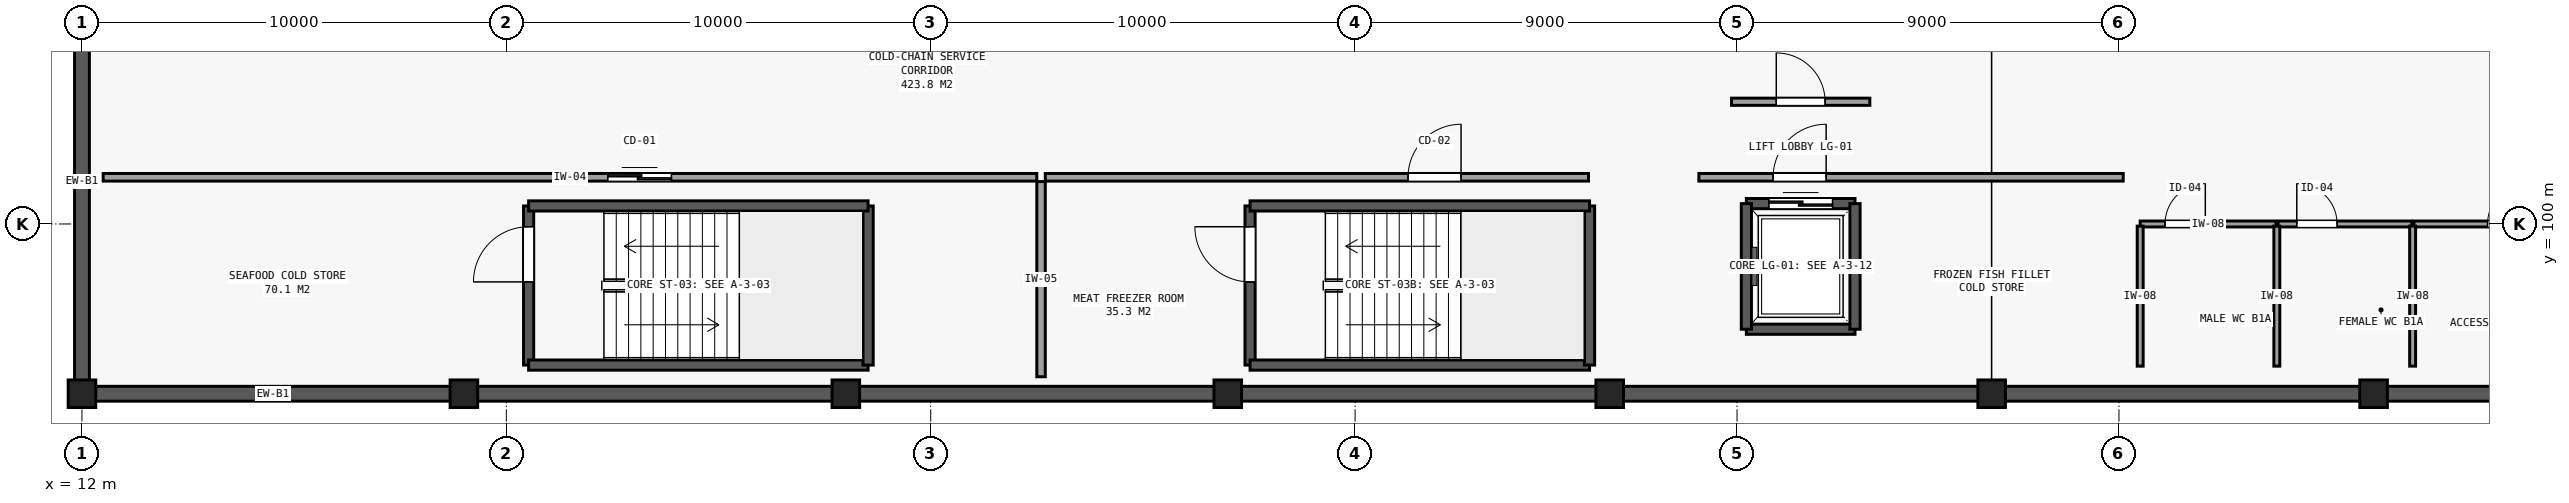
"""IFC4 building model, lengths in metres.
Left out: names, types, materials, properties, quantities, classifications, styles, units other than length and angle.
Written with IfcOpenShell. Run it as: python <this file> out.ifc"""

import sys

from ifc_helpers import new_model, si_unit, direction, frame, frame_2d, origin, origin_2d, place, context, subcontext, project, spatial, rectangle, extrude, element, fill, save


model = new_model("IFC4")
c1 = context("Model", 3, precision=1e-05, world=origin(), true_north=direction((0.0, 1.0)))
c2 = subcontext(c1, "Body", "Model", "MODEL_VIEW")
j1 = project(units=[si_unit("LENGTHUNIT", "METRE"), si_unit("PLANEANGLEUNIT", "RADIAN")], contexts=[c1])
p1 = place(None, origin())
s1 = spatial("IfcSite", under=j1, at=p1, CompositionType="ELEMENT")
p2 = place(p1, origin())
s2 = spatial("IfcBuilding", under=s1, at=p2, CompositionType="ELEMENT")
p3 = place(p2, frame((0.0, 0.0, -4.2)))
s3 = spatial("IfcBuildingStorey", under=s2, at=p3, CompositionType="ELEMENT", Elevation=-4.2)
for number, where, z_axis, x_axis in (
    (1, (12.0, 96.0, -0.4), (0.0, 0.0, 1.0), (1.0, 0.0, 0.0)),
    (2, (21.0, 96.0, -0.4), (0.0, 0.0, 1.0), (1.0, 0.0, 0.0)),
    (3, (30.0, 96.0, -0.4), (0.0, 0.0, 1.0), (1.0, 0.0, 0.0)),
    (4, (39.0, 96.0, -0.4), (0.0, 0.0, 1.0), (1.0, 0.0, 0.0)),
    (5, (48.0, 96.0, -0.4), (0.0, 0.0, 1.0), (1.0, 0.0, 0.0)),
    (6, (57.0, 96.0, -0.4), (0.0, 0.0, 1.0), (1.0, 0.0, 0.0)),
    (7, (66.0, 96.0, -0.4), (0.0, 0.0, 1.0), (1.0, 0.0, 0.0)),
):
    element("IfcColumn", number, at=place(p3, frame(where, z_axis=z_axis, x_axis=x_axis)), inside=s3, PredefinedType="COLUMN", context=c2, shape_type="SweptSolid", body=[
        extrude(rectangle(XDim=0.65, YDim=0.65, at=origin_2d()), origin(), (0.0, 0.0, 1.0), 4.6),
    ])
for number, where, z_axis, x_axis in (
    (8, (21.0, 96.0, 0.0), (0.0, 0.0, 1.0), (-1.0, 0.0, 0.0)),
    (9, (30.0, 96.0, 0.0), (0.0, 0.0, 1.0), (-1.0, 0.0, 0.0)),
    (10, (39.0, 96.0, 0.0), (0.0, 0.0, 1.0), (-1.0, 0.0, 0.0)),
    (11, (48.0, 96.0, 0.0), (0.0, 0.0, 1.0), (-1.0, 0.0, 0.0)),
    (12, (57.0, 96.0, 0.0), (0.0, 0.0, 1.0), (-1.0, 0.0, 0.0)),
    (13, (66.0, 96.0, 0.0), (0.0, 0.0, 1.0), (-1.0, 0.0, 0.0)),
    (14, (75.0, 96.0, 0.0), (0.0, 0.0, 1.0), (-1.0, 0.0, 0.0)),
):
    element("IfcWall", number, at=place(p3, frame(where, z_axis=z_axis, x_axis=x_axis)), inside=s3, PredefinedType="SOLIDWALL", context=c2, shape_type="SweptSolid", body=[
        extrude(rectangle(XDim=9.0, YDim=0.35, at=frame_2d((4.5, 0.0))), origin(), (0.0, 0.0, 1.0), 3.84),
    ])
p4 = place(p3, frame((12.0, 96.0, 0.0), z_axis=(0.0, 0.0, 1.0), x_axis=(0.0, 1.0, 0.0)))
e15 = element("IfcWall", 15, at=p4, inside=s3, PredefinedType="SOLIDWALL", context=c2, shape_type="SweptSolid", body=[
    extrude(rectangle(XDim=10.0, YDim=0.35, at=frame_2d((5.0, 0.0))), origin(), (0.0, 0.0, 1.0), 3.84),
])
p5 = place(p3, frame((22.525, 96.675, 0.0), z_axis=(0.0, 0.0, 1.0), x_axis=(0.0, 1.0, 0.0)))
e16 = element("IfcWall", 16, at=p5, inside=s3, PredefinedType="SOLIDWALL", context=c2, shape_type="SweptSolid", body=[
    extrude(rectangle(XDim=3.75, YDim=0.24, at=frame_2d((1.875, 0.0))), origin(), (0.0, 0.0, 1.0), 3.84),
])
p6 = place(p5, frame((1.96, 0.0, 0.0)))
e17 = element("IfcOpeningElement", 17, at=p6, cuts=e16, PredefinedType="OPENING", context=c2, shape_type="SweptSolid", body=[
    extrude(rectangle(XDim=1.3, YDim=2.15, at=frame_2d((0.65, 1.075))), frame((0.0, 0.13, 0.0), z_axis=(0.0, -1.0, 0.0), x_axis=(1.0, 0.0, 0.0)), (0.0, 0.0, 1.0), 0.26),
])
p7 = place(p3, frame((30.525, 96.675, 0.0), z_axis=(0.0, 0.0, 1.0), x_axis=(-1.0, 0.0, 0.0)))
e18 = element("IfcWall", 18, at=p7, inside=s3, PredefinedType="SOLIDWALL", context=c2, shape_type="SweptSolid", body=[
    extrude(rectangle(XDim=8.0, YDim=0.24, at=frame_2d((4.0, 0.0))), origin(), (0.0, 0.0, 1.0), 3.84),
])
p8 = place(p3, frame((30.525, 100.425, 0.0), z_axis=(0.0, 0.0, 1.0), x_axis=(0.0, -1.0, 0.0)))
e19 = element("IfcWall", 19, at=p8, inside=s3, PredefinedType="SOLIDWALL", context=c2, shape_type="SweptSolid", body=[
    extrude(rectangle(XDim=3.75, YDim=0.24, at=frame_2d((1.875, 0.0))), origin(), (0.0, 0.0, 1.0), 3.84),
])
p9 = place(p3, frame((22.525, 100.425, 0.0), z_axis=(0.0, 0.0, 1.0), x_axis=(1.0, 0.0, 0.0)))
e20 = element("IfcWall", 20, at=p9, inside=s3, PredefinedType="SOLIDWALL", context=c2, shape_type="SweptSolid", body=[
    extrude(rectangle(XDim=8.0, YDim=0.24, at=frame_2d((4.0, 0.0))), origin(), (0.0, 0.0, 1.0), 3.84),
])
p10 = place(p3, frame((39.525, 96.675, 0.0), z_axis=(0.0, 0.0, 1.0), x_axis=(0.0, 1.0, 0.0)))
e21 = element("IfcWall", 21, at=p10, inside=s3, PredefinedType="SOLIDWALL", context=c2, shape_type="SweptSolid", body=[
    extrude(rectangle(XDim=3.75, YDim=0.24, at=frame_2d((1.875, 0.0))), origin(), (0.0, 0.0, 1.0), 3.84),
])
p11 = place(p10, frame((1.96, 0.0, 0.0)))
e22 = element("IfcOpeningElement", 22, at=p11, cuts=e21, PredefinedType="OPENING", context=c2, shape_type="SweptSolid", body=[
    extrude(rectangle(XDim=1.3, YDim=2.15, at=frame_2d((0.65, 1.075))), frame((0.0, 0.13, 0.0), z_axis=(0.0, -1.0, 0.0), x_axis=(1.0, 0.0, 0.0)), (0.0, 0.0, 1.0), 0.26),
])
p12 = place(p3, frame((47.525, 96.675, 0.0), z_axis=(0.0, 0.0, 1.0), x_axis=(-1.0, 0.0, 0.0)))
e23 = element("IfcWall", 23, at=p12, inside=s3, PredefinedType="SOLIDWALL", context=c2, shape_type="SweptSolid", body=[
    extrude(rectangle(XDim=8.0, YDim=0.24, at=frame_2d((4.0, 0.0))), origin(), (0.0, 0.0, 1.0), 3.84),
])
p13 = place(p3, frame((47.525, 100.425, 0.0), z_axis=(0.0, 0.0, 1.0), x_axis=(0.0, -1.0, 0.0)))
e24 = element("IfcWall", 24, at=p13, inside=s3, PredefinedType="SOLIDWALL", context=c2, shape_type="SweptSolid", body=[
    extrude(rectangle(XDim=3.75, YDim=0.24, at=frame_2d((1.875, 0.0))), origin(), (0.0, 0.0, 1.0), 3.84),
])
p14 = place(p3, frame((39.525, 100.425, 0.0), z_axis=(0.0, 0.0, 1.0), x_axis=(1.0, 0.0, 0.0)))
e25 = element("IfcWall", 25, at=p14, inside=s3, PredefinedType="SOLIDWALL", context=c2, shape_type="SweptSolid", body=[
    extrude(rectangle(XDim=8.0, YDim=0.24, at=frame_2d((4.0, 0.0))), origin(), (0.0, 0.0, 1.0), 3.84),
])
p15 = place(p3, frame((53.78, 97.52, 0.0), z_axis=(0.0, 0.0, 1.0), x_axis=(-1.0, 0.0, 0.0)))
e26 = element("IfcWall", 26, at=p15, inside=s3, PredefinedType="SOLIDWALL", context=c2, shape_type="SweptSolid", body=[
    extrude(rectangle(XDim=2.56, YDim=0.24, at=frame_2d((1.28, 0.0))), origin(), (0.0, 0.0, 1.0), 3.8),
])
p16 = place(p3, frame((51.22, 100.48, 0.0), z_axis=(0.0, 0.0, 1.0), x_axis=(1.0, 0.0, 0.0)))
e27 = element("IfcWall", 27, at=p16, inside=s3, PredefinedType="SOLIDWALL", context=c2, shape_type="SweptSolid", body=[
    extrude(rectangle(XDim=2.56, YDim=0.24, at=frame_2d((1.28, 0.0))), origin(), (0.0, 0.0, 1.0), 3.8),
])
p17 = place(p16, frame((0.53, 0.0, 0.0)))
e28 = element("IfcOpeningElement", 28, at=p17, cuts=e27, PredefinedType="OPENING", context=c2, shape_type="SweptSolid", body=[
    extrude(rectangle(XDim=1.5, YDim=2.25, at=frame_2d((0.75, 1.125))), frame((0.0, 0.13, 0.0), z_axis=(0.0, -1.0, 0.0), x_axis=(1.0, 0.0, 0.0)), (0.0, 0.0, 1.0), 0.26),
])
for number, where, z_axis, x_axis in (
    (29, (51.22, 97.52, 0.0), (0.0, 0.0, 1.0), (0.0, 1.0, 0.0)),
    (30, (53.78, 100.48, 0.0), (0.0, 0.0, 1.0), (0.0, -1.0, 0.0)),
):
    element("IfcWall", number, at=place(p3, frame(where, z_axis=z_axis, x_axis=x_axis)), inside=s3, PredefinedType="SOLIDWALL", context=c2, shape_type="SweptSolid", body=[
        extrude(rectangle(XDim=2.96, YDim=0.24, at=frame_2d((1.48, 0.0))), origin(), (0.0, 0.0, 1.0), 3.8),
    ])
p18 = place(p3, frame((50.87, 102.88, 0.0), z_axis=(0.0, 0.0, 1.0), x_axis=(1.0, 0.0, 0.0)))
e31 = element("IfcWall", 31, at=p18, inside=s3, PredefinedType="PARTITIONING", context=c2, shape_type="SweptSolid", body=[
    extrude(rectangle(XDim=3.26, YDim=0.17, at=frame_2d((1.63, 0.0))), origin(), (0.0, 0.0, 1.0), 3.8),
])
p19 = place(p18, frame((1.055, 0.0, 0.0)))
e32 = element("IfcOpeningElement", 32, at=p19, cuts=e31, PredefinedType="OPENING", context=c2, shape_type="SweptSolid", body=[
    extrude(rectangle(XDim=1.15, YDim=2.15, at=frame_2d((0.575, 1.075))), frame((0.0, 0.095, 0.0), z_axis=(0.0, -1.0, 0.0), x_axis=(1.0, 0.0, 0.0)), (0.0, 0.0, 1.0), 0.19),
])
p20 = place(p3, frame((60.5, 100.0, 0.0), z_axis=(0.0, 0.0, 1.0), x_axis=(1.0, 0.0, 0.0)))
e33 = element("IfcWall", 33, at=p20, inside=s3, PredefinedType="PARTITIONING", context=c2, shape_type="SweptSolid", body=[
    extrude(rectangle(XDim=3.2, YDim=0.14, at=frame_2d((1.6, 0.0))), origin(), (0.0, 0.0, 1.0), 3.8),
])
p21 = place(p20, frame((0.585, 0.0, 0.0)))
e34 = element("IfcOpeningElement", 34, at=p21, cuts=e33, PredefinedType="OPENING", context=c2, shape_type="SweptSolid", body=[
    extrude(rectangle(XDim=0.95, YDim=2.1, at=frame_2d((0.475, 1.05))), frame((0.0, 0.08, 0.0), z_axis=(0.0, -1.0, 0.0), x_axis=(1.0, 0.0, 0.0)), (0.0, 0.0, 1.0), 0.16),
])
p22 = place(p3, frame((63.75, 100.0, 0.0), z_axis=(0.0, 0.0, 1.0), x_axis=(1.0, 0.0, 0.0)))
e35 = element("IfcWall", 35, at=p22, inside=s3, PredefinedType="PARTITIONING", context=c2, shape_type="SweptSolid", body=[
    extrude(rectangle(XDim=3.15, YDim=0.14, at=frame_2d((1.575, 0.0))), origin(), (0.0, 0.0, 1.0), 2.99),
])
p23 = place(p22, frame((0.44, 0.0, 0.0)))
e36 = element("IfcOpeningElement", 36, at=p23, cuts=e35, PredefinedType="OPENING", context=c2, shape_type="SweptSolid", body=[
    extrude(rectangle(XDim=0.95, YDim=2.1, at=frame_2d((0.475, 1.05))), frame((0.0, 0.08, 0.0), z_axis=(0.0, -1.0, 0.0), x_axis=(1.0, 0.0, 0.0)), (0.0, 0.0, 1.0), 0.16),
])
p24 = place(p3, frame((66.95, 100.0, 0.0), z_axis=(0.0, 0.0, 1.0), x_axis=(1.0, 0.0, 0.0)))
e37 = element("IfcWall", 37, at=p24, inside=s3, PredefinedType="PARTITIONING", context=c2, shape_type="SweptSolid", body=[
    extrude(rectangle(XDim=3.15, YDim=0.14, at=frame_2d((1.575, 0.0))), origin(), (0.0, 0.0, 1.0), 3.8),
])
p25 = place(p24, frame((1.736, 0.0, 0.0)))
e38 = element("IfcOpeningElement", 38, at=p25, cuts=e37, PredefinedType="OPENING", context=c2, shape_type="SweptSolid", body=[
    extrude(rectangle(XDim=0.98, YDim=2.15, at=frame_2d((0.49, 1.075))), frame((0.0, 0.08, 0.0), z_axis=(0.0, -1.0, 0.0), x_axis=(1.0, 0.0, 0.0)), (0.0, 0.0, 1.0), 0.16),
])
for number, where, z_axis, x_axis in (
    (39, (63.72, 96.65, 0.0), (0.0, 0.0, 1.0), (0.0, 1.0, 0.0)),
    (40, (66.92, 96.65, 0.0), (0.0, 0.0, 1.0), (0.0, 1.0, 0.0)),
    (41, (60.5, 96.65, 0.0), (0.0, 0.0, 1.0), (0.0, 1.0, 0.0)),
):
    element("IfcWall", number, at=place(p3, frame(where, z_axis=z_axis, x_axis=x_axis)), inside=s3, PredefinedType="PARTITIONING", context=c2, shape_type="SweptSolid", body=[
        extrude(rectangle(XDim=3.3, YDim=0.14, at=frame_2d((1.65, 0.0))), origin(), (0.0, 0.0, 1.0), 3.8),
    ])
p26 = place(p3, frame((12.5, 101.1, 0.0), z_axis=(0.0, 0.0, 1.0), x_axis=(1.0, 0.0, 0.0)))
e42 = element("IfcWall", 42, at=p26, inside=s3, PredefinedType="PARTITIONING", context=c2, shape_type="SweptSolid", body=[
    extrude(rectangle(XDim=22.0, YDim=0.18, at=frame_2d((11.0, 0.0))), origin(), (0.0, 0.0, 1.0), 2.74),
])
p27 = place(p26, frame((11.89, 0.0, 0.0)))
e43 = element("IfcOpeningElement", 43, at=p27, cuts=e42, PredefinedType="OPENING", context=c2, shape_type="SweptSolid", body=[
    extrude(rectangle(XDim=1.5, YDim=2.25, at=frame_2d((0.75, 1.125))), frame((0.0, 0.1, 0.0), z_axis=(0.0, -1.0, 0.0), x_axis=(1.0, 0.0, 0.0)), (0.0, 0.0, 1.0), 0.2),
])
p28 = place(p3, frame((34.7, 101.1, 0.0), z_axis=(0.0, 0.0, 1.0), x_axis=(1.0, 0.0, 0.0)))
e44 = element("IfcWall", 44, at=p28, inside=s3, PredefinedType="PARTITIONING", context=c2, shape_type="SweptSolid", body=[
    extrude(rectangle(XDim=12.8, YDim=0.18, at=frame_2d((6.4, 0.0))), origin(), (0.0, 0.0, 1.0), 2.74),
])
p29 = place(p28, frame((8.547, 0.0, 0.0)))
e45 = element("IfcOpeningElement", 45, at=p29, cuts=e44, PredefinedType="OPENING", context=c2, shape_type="SweptSolid", body=[
    extrude(rectangle(XDim=1.25, YDim=2.2, at=frame_2d((0.625, 1.1))), frame((0.0, 0.1, 0.0), z_axis=(0.0, -1.0, 0.0), x_axis=(1.0, 0.0, 0.0)), (0.0, 0.0, 1.0), 0.2),
])
p30 = place(p3, frame((34.6, 96.4, 0.0), z_axis=(0.0, 0.0, 1.0), x_axis=(0.0, 1.0, 0.0)))
e46 = element("IfcWall", 46, at=p30, inside=s3, PredefinedType="PARTITIONING", context=c2, shape_type="SweptSolid", body=[
    extrude(rectangle(XDim=4.6, YDim=0.2, at=frame_2d((2.3, 0.0))), origin(), (0.0, 0.0, 1.0), 3.8),
])
p31 = place(p3, frame((50.1, 101.1, 0.0), z_axis=(0.0, 0.0, 1.0), x_axis=(1.0, 0.0, 0.0)))
e47 = element("IfcWall", 47, at=p31, inside=s3, PredefinedType="PARTITIONING", context=c2, shape_type="SweptSolid", body=[
    extrude(rectangle(XDim=10.0, YDim=0.18, at=frame_2d((5.0, 0.0))), origin(), (0.0, 0.0, 1.0), 2.99),
])
p32 = place(p31, frame((1.75, 0.0, 0.0)))
e48 = element("IfcOpeningElement", 48, at=p32, cuts=e47, PredefinedType="OPENING", context=c2, shape_type="SweptSolid", body=[
    extrude(rectangle(XDim=1.25, YDim=2.2, at=frame_2d((0.625, 1.1))), frame((0.0, 0.1, 0.0), z_axis=(0.0, -1.0, 0.0), x_axis=(1.0, 0.0, 0.0)), (0.0, 0.0, 1.0), 0.2),
])
p33 = place(p6, origin())
e49 = element("IfcDoor", 49, at=p33, inside=s3, OperationType="SINGLE_SWING_LEFT", PredefinedType="DOOR", context=c2, shape_type="SweptSolid", body=[
    extrude(rectangle(XDim=1.3, YDim=2.15, at=frame_2d((0.65, 1.075))), frame((0.0, 0.025, 0.0), z_axis=(0.0, -1.0, 0.0), x_axis=(1.0, 0.0, 0.0)), (0.0, 0.0, 1.0), 0.05),
])
fill(e17, e49)
p34 = place(p11, origin())
e50 = element("IfcDoor", 50, at=p34, inside=s3, OperationType="SINGLE_SWING_RIGHT", PredefinedType="DOOR", context=c2, shape_type="SweptSolid", body=[
    extrude(rectangle(XDim=1.3, YDim=2.15, at=frame_2d((0.65, 1.075))), frame((0.0, 0.025, 0.0), z_axis=(0.0, -1.0, 0.0), x_axis=(1.0, 0.0, 0.0)), (0.0, 0.0, 1.0), 0.05),
])
fill(e22, e50)
p35 = place(p17, origin())
e51 = element("IfcDoor", 51, at=p35, inside=s3, OperationType="DOUBLE_DOOR_SLIDING", PredefinedType="DOOR", context=c2, shape_type="SweptSolid", body=[
    extrude(rectangle(XDim=1.5, YDim=2.25, at=frame_2d((0.75, 1.125))), frame((0.0, 0.025, 0.0), z_axis=(0.0, -1.0, 0.0), x_axis=(1.0, 0.0, 0.0)), (0.0, 0.0, 1.0), 0.05),
])
fill(e28, e51)
p36 = place(p19, origin())
e52 = element("IfcDoor", 52, at=p36, inside=s3, OperationType="SINGLE_SWING_LEFT", PredefinedType="DOOR", context=c2, shape_type="SweptSolid", body=[
    extrude(rectangle(XDim=1.15, YDim=2.15, at=frame_2d((0.575, 1.075))), frame((0.0, 0.025, 0.0), z_axis=(0.0, -1.0, 0.0), x_axis=(1.0, 0.0, 0.0)), (0.0, 0.0, 1.0), 0.05),
])
fill(e32, e52)
p37 = place(p21, origin())
e53 = element("IfcDoor", 53, at=p37, inside=s3, OperationType="SINGLE_SWING_RIGHT", PredefinedType="DOOR", context=c2, shape_type="SweptSolid", body=[
    extrude(rectangle(XDim=0.95, YDim=2.1, at=frame_2d((0.475, 1.05))), frame((0.0, 0.025, 0.0), z_axis=(0.0, -1.0, 0.0), x_axis=(1.0, 0.0, 0.0)), (0.0, 0.0, 1.0), 0.05),
])
fill(e34, e53)
p38 = place(p23, origin())
e54 = element("IfcDoor", 54, at=p38, inside=s3, OperationType="SINGLE_SWING_LEFT", PredefinedType="DOOR", context=c2, shape_type="SweptSolid", body=[
    extrude(rectangle(XDim=0.95, YDim=2.1, at=frame_2d((0.475, 1.05))), frame((0.0, 0.025, 0.0), z_axis=(0.0, -1.0, 0.0), x_axis=(1.0, 0.0, 0.0)), (0.0, 0.0, 1.0), 0.05),
])
fill(e36, e54)
p39 = place(p25, origin())
e55 = element("IfcDoor", 55, at=p39, inside=s3, OperationType="SINGLE_SWING_RIGHT", PredefinedType="DOOR", context=c2, shape_type="SweptSolid", body=[
    extrude(rectangle(XDim=0.98, YDim=2.15, at=frame_2d((0.49, 1.075))), frame((0.0, 0.025, 0.0), z_axis=(0.0, -1.0, 0.0), x_axis=(1.0, 0.0, 0.0)), (0.0, 0.0, 1.0), 0.05),
])
fill(e38, e55)
p40 = place(p27, origin())
e56 = element("IfcDoor", 56, at=p40, inside=s3, OperationType="SLIDING_TO_LEFT", PredefinedType="DOOR", context=c2, shape_type="SweptSolid", body=[
    extrude(rectangle(XDim=1.5, YDim=2.25, at=frame_2d((0.75, 1.125))), frame((0.0, 0.025, 0.0), z_axis=(0.0, -1.0, 0.0), x_axis=(1.0, 0.0, 0.0)), (0.0, 0.0, 1.0), 0.05),
])
fill(e43, e56)
p41 = place(p29, origin())
e57 = element("IfcDoor", 57, at=p41, inside=s3, OperationType="SINGLE_SWING_RIGHT", PredefinedType="DOOR", context=c2, shape_type="SweptSolid", body=[
    extrude(rectangle(XDim=1.25, YDim=2.2, at=frame_2d((0.625, 1.1))), frame((0.0, 0.025, 0.0), z_axis=(0.0, -1.0, 0.0), x_axis=(1.0, 0.0, 0.0)), (0.0, 0.0, 1.0), 0.05),
])
fill(e45, e57)
p42 = place(p32, origin())
e58 = element("IfcDoor", 58, at=p42, inside=s3, OperationType="SINGLE_SWING_RIGHT", PredefinedType="DOOR", context=c2, shape_type="SweptSolid", body=[
    extrude(rectangle(XDim=1.25, YDim=2.2, at=frame_2d((0.625, 1.1))), frame((0.0, 0.025, 0.0), z_axis=(0.0, -1.0, 0.0), x_axis=(1.0, 0.0, 0.0)), (0.0, 0.0, 1.0), 0.05),
])
fill(e48, e58)
save(model, sys.argv[1])
